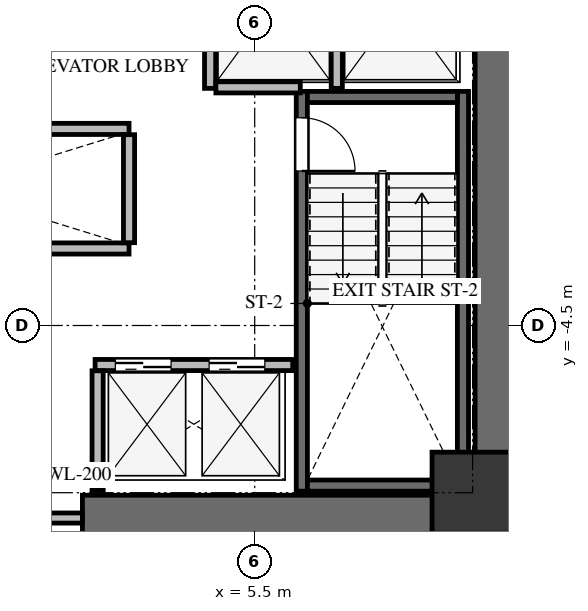
"""IFC4 building model, lengths in metres.
Left out: names, types, materials, properties, quantities, classifications, styles, units other than length and angle.
Written with IfcOpenShell. Run it as: python <this file> out.ifc"""

import sys

from ifc_helpers import new_model, si_unit, direction, frame, frame_2d, origin, origin_2d, place, context, subcontext, project, spatial, rectangle, extrude, source, transform, mapped, element, fill, save


model = new_model("IFC4")
c1 = context("Model", 3, precision=1e-05, world=origin(), true_north=direction((0.0, 1.0)))
c2 = subcontext(c1, "Body", "Model", "MODEL_VIEW")
j1 = project(units=[si_unit("LENGTHUNIT", "METRE"), si_unit("PLANEANGLEUNIT", "RADIAN")], contexts=[c1])
p1 = place(None, origin())
s1 = spatial("IfcSite", under=j1, at=p1, CompositionType="ELEMENT")
p2 = place(p1, origin())
s2 = spatial("IfcBuilding", under=s1, at=p2, CompositionType="ELEMENT")
p3 = place(p2, frame((0.0, 0.0, 35.7)))
s3 = spatial("IfcBuildingStorey", under=s2, at=p3, CompositionType="ELEMENT", Elevation=35.7)
p4 = place(p3, frame((10.3, -8.75, 0.0), z_axis=(0.0, 0.0, 1.0), x_axis=(0.0, 1.0, 0.0)))
e1 = element("IfcWall", 1, at=p4, inside=s3, PredefinedType="SHEAR", context=c2, shape_type="SweptSolid", body=[
    extrude(rectangle(XDim=17.5, YDim=0.9, at=frame_2d((8.75, 0.0))), origin(), (0.0, 0.0, 1.0), 3.3),
])
p5 = place(p3, frame((2.1, -8.3, 0.0), z_axis=(0.0, 0.0, 1.0), x_axis=(1.0, 0.0, 0.0)))
e2 = element("IfcWall", 2, at=p5, inside=s3, PredefinedType="SHEAR", context=c2, shape_type="SweptSolid", body=[
    extrude(rectangle(XDim=7.75, YDim=0.9, at=frame_2d((3.875, 0.0))), origin(), (0.0, 0.0, 1.0), 3.3),
])
p6 = place(p3, frame((9.61, -7.77, -0.24), z_axis=(0.0, 0.0, 1.0), x_axis=(0.0, 1.0, 0.0)))
e3 = element("IfcWall", 3, at=p6, inside=s3, PredefinedType="SHEAR", context=c2, shape_type="SweptSolid", body=[
    extrude(rectangle(XDim=7.89, YDim=0.22, at=frame_2d((3.945, 0.0))), origin(), (0.0, 0.0, 1.0), 3.3),
])
p7 = place(p3, frame((6.43, 0.12, -0.24), z_axis=(0.0, 0.0, 1.0), x_axis=(0.0, -1.0, 0.0)))
e4 = element("IfcWall", 4, at=p7, inside=s3, PredefinedType="SHEAR", context=c2, shape_type="SweptSolid", body=[
    extrude(rectangle(XDim=7.89, YDim=0.22, at=frame_2d((3.945, 0.0))), origin(), (0.0, 0.0, 1.0), 3.3),
])
p8 = place(p7, frame((0.52, 0.0, 0.0)))
e5 = element("IfcOpeningElement", 5, at=p8, cuts=e4, PredefinedType="OPENING", context=c2, shape_type="SweptSolid", body=[
    extrude(rectangle(XDim=1.05, YDim=2.15, at=frame_2d((0.525, 1.075))), frame((0.0, 0.12, 0.0), z_axis=(0.0, -1.0, 0.0), x_axis=(1.0, 0.0, 0.0)), (0.0, 0.0, 1.0), 0.24),
])
for number, where, z_axis, x_axis in (
    (6, (6.54, -7.66, -0.24), (0.0, 0.0, 1.0), (1.0, 0.0, 0.0)),
    (7, (9.5, 0.01, -0.24), (0.0, 0.0, 1.0), (-1.0, 0.0, 0.0)),
):
    element("IfcWall", number, at=place(p3, frame(where, z_axis=z_axis, x_axis=x_axis)), inside=s3, PredefinedType="SHEAR", context=c2, shape_type="SweptSolid", body=[
        extrude(rectangle(XDim=2.96, YDim=0.22, at=frame_2d((1.48, 0.0))), origin(), (0.0, 0.0, 1.0), 3.3),
    ])
m1 = source(origin(), c2, "Body", "SweptSolid", [
    extrude(rectangle(XDim=1.6, YDim=1.6, at=origin_2d()), origin(), (0.0, 0.0, 1.0), 3.3),
])
p9 = place(p3, frame((9.8, -7.8, -0.24), z_axis=(0.0, 0.0, 1.0), x_axis=(1.0, 0.0, 0.0)))
e8 = element("IfcColumn", 8, at=p9, inside=s3, PredefinedType="COLUMN", context=c2, shape_type="MappedRepresentation", body=[
    mapped(m1, transform((0.0, 0.0, 0.0), x_axis=(1.0, 0.0, 0.0), y_axis=(0.0, 1.0, 0.0), z_axis=(0.0, 0.0, 1.0), scale=1.0)),
])
p10 = place(p3, frame((-2.1, -8.3, 0.0), z_axis=(0.0, 0.0, 1.0), x_axis=(1.0, 0.0, 0.0)))
e9 = element("IfcWall", 9, at=p10, inside=s3, PredefinedType="SOLIDWALL", context=c2, shape_type="SweptSolid", body=[
    extrude(rectangle(XDim=4.2, YDim=0.2, at=frame_2d((2.1, 0.0))), origin(), (0.0, 0.0, 1.0), 3.045),
])
p11 = place(p10, frame((1.2, 0.0, 0.0)))
e10 = element("IfcOpeningElement", 10, at=p11, cuts=e9, PredefinedType="OPENING", context=c2, shape_type="SweptSolid", body=[
    extrude(rectangle(XDim=1.8, YDim=2.15, at=frame_2d((0.9, 1.075))), frame((0.0, 0.11, 0.0), z_axis=(0.0, -1.0, 0.0), x_axis=(1.0, 0.0, 0.0)), (0.0, 0.0, 1.0), 0.22),
])
for number, where, z_axis, x_axis in (
    (11, (4.62, 0.18, 0.0), (0.0, 0.0, 1.0), (0.0, 1.0, 0.0)),
    (12, (7.12, 0.18, 0.0), (0.0, 0.0, 1.0), (0.0, 1.0, 0.0)),
):
    element("IfcWall", number, at=place(p3, frame(where, z_axis=z_axis, x_axis=x_axis)), inside=s3, PredefinedType="SOLIDWALL", context=c2, shape_type="SweptSolid", body=[
        extrude(rectangle(XDim=3.186, YDim=0.22, at=frame_2d((1.593, 0.0))), origin(), (0.0, 0.0, 1.0), 3.045),
    ])
p12 = place(p3, frame((4.734, 0.2, 0.0), z_axis=(0.0, 0.0, 1.0), x_axis=(1.0, 0.0, 0.0)))
e13 = element("IfcWall", 13, at=p12, inside=s3, PredefinedType="SOLIDWALL", context=c2, shape_type="SweptSolid", body=[
    extrude(rectangle(XDim=1.666, YDim=0.22, at=frame_2d((0.833, 0.0))), origin(), (0.0, 0.0, 1.0), 3.045),
])
p13 = place(p3, frame((2.35, -5.28, 0.0), z_axis=(0.0, 0.0, 1.0), x_axis=(1.0, 0.0, 0.0)))
e14 = element("IfcWall", 14, at=p13, inside=s3, PredefinedType="SOLIDWALL", context=c2, shape_type="SweptSolid", body=[
    extrude(rectangle(XDim=3.9, YDim=0.22, at=frame_2d((1.95, 0.0))), origin(), (0.0, 0.0, 1.0), 3.045),
])
p14 = place(p13, frame((0.4, 0.0, 0.0)))
e15 = element("IfcOpeningElement", 15, at=p14, cuts=e14, PredefinedType="OPENING", context=c2, shape_type="SweptSolid", body=[
    extrude(rectangle(XDim=1.1, YDim=2.15, at=frame_2d((0.55, 1.075))), frame((0.0, 0.12, 0.0), z_axis=(0.0, -1.0, 0.0), x_axis=(1.0, 0.0, 0.0)), (0.0, 0.0, 1.0), 0.24),
])
p15 = place(p13, frame((2.25, 0.0, 0.0)))
e16 = element("IfcOpeningElement", 16, at=p15, cuts=e14, PredefinedType="OPENING", context=c2, shape_type="SweptSolid", body=[
    extrude(rectangle(XDim=1.1, YDim=2.15, at=frame_2d((0.55, 1.075))), frame((0.0, 0.12, 0.0), z_axis=(0.0, -1.0, 0.0), x_axis=(1.0, 0.0, 0.0)), (0.0, 0.0, 1.0), 0.24),
])
p16 = place(p3, frame((2.4, -7.75, 0.0), z_axis=(0.0, 0.0, 1.0), x_axis=(0.0, 1.0, 0.0)))
e17 = element("IfcWall", 17, at=p16, inside=s3, PredefinedType="SOLIDWALL", context=c2, shape_type="SweptSolid", body=[
    extrude(rectangle(XDim=2.356, YDim=0.22, at=frame_2d((1.178, 0.0))), origin(), (0.0, 0.0, 1.0), 3.045),
])
for number, where, z_axis, x_axis in (
    (18, (-4.22, -2.98, 0.0), (0.0, 0.0, 1.0), (1.0, 0.0, 0.0)),
    (19, (-4.22, -0.62, 0.0), (0.0, 0.0, 1.0), (1.0, 0.0, 0.0)),
):
    element("IfcWall", number, at=place(p3, frame(where, z_axis=z_axis, x_axis=x_axis)), inside=s3, PredefinedType="SOLIDWALL", context=c2, shape_type="SweptSolid", body=[
        extrude(rectangle(XDim=7.24, YDim=0.22, at=frame_2d((3.62, 0.0))), origin(), (0.0, 0.0, 1.0), 3.045),
    ])
p17 = place(p3, frame((3.02, -2.866, 0.0), z_axis=(0.0, 0.0, 1.0), x_axis=(0.0, 1.0, 0.0)))
e20 = element("IfcWall", 20, at=p17, inside=s3, PredefinedType="SOLIDWALL", context=c2, shape_type="SweptSolid", body=[
    extrude(rectangle(XDim=2.132, YDim=0.22, at=frame_2d((1.066, 0.0))), origin(), (0.0, 0.0, 1.0), 3.045),
])
m2 = source(origin(), c2, "Body", "SweptSolid", [
    extrude(rectangle(XDim=1.05, YDim=2.15, at=frame_2d((0.525, 1.075))), frame((0.0, 0.025, 0.0), z_axis=(0.0, -1.0, 0.0), x_axis=(1.0, 0.0, 0.0)), (0.0, 0.0, 1.0), 0.05),
])
p18 = place(p8, origin())
e21 = element("IfcDoor", 21, at=p18, inside=s3, OperationType="SINGLE_SWING_RIGHT", PredefinedType="DOOR", context=c2, shape_type="MappedRepresentation", body=[
    mapped(m2, transform((0.0, 0.0, 0.0), x_axis=(1.0, 0.0, 0.0), y_axis=(0.0, 1.0, 0.0), z_axis=(0.0, 0.0, 1.0), scale=1.0)),
])
fill(e5, e21)
m3 = source(origin(), c2, "Body", "SweptSolid", [
    extrude(rectangle(XDim=1.1, YDim=2.15, at=frame_2d((0.55, 1.075))), frame((0.0, 0.025, 0.0), z_axis=(0.0, -1.0, 0.0), x_axis=(1.0, 0.0, 0.0)), (0.0, 0.0, 1.0), 0.05),
])
p19 = place(p14, origin())
e22 = element("IfcDoor", 22, at=p19, inside=s3, OperationType="DOUBLE_DOOR_SLIDING", PredefinedType="DOOR", context=c2, shape_type="MappedRepresentation", body=[
    mapped(m3, transform((0.0, 0.0, 0.0), x_axis=(1.0, 0.0, 0.0), y_axis=(0.0, 1.0, 0.0), z_axis=(0.0, 0.0, 1.0), scale=1.0)),
])
fill(e15, e22)
p20 = place(p15, origin())
e23 = element("IfcDoor", 23, at=p20, inside=s3, OperationType="DOUBLE_DOOR_SLIDING", PredefinedType="DOOR", context=c2, shape_type="MappedRepresentation", body=[
    mapped(m3, transform((0.0, 0.0, 0.0), x_axis=(1.0, 0.0, 0.0), y_axis=(0.0, 1.0, 0.0), z_axis=(0.0, 0.0, 1.0), scale=1.0)),
])
fill(e16, e23)
save(model, sys.argv[1])
